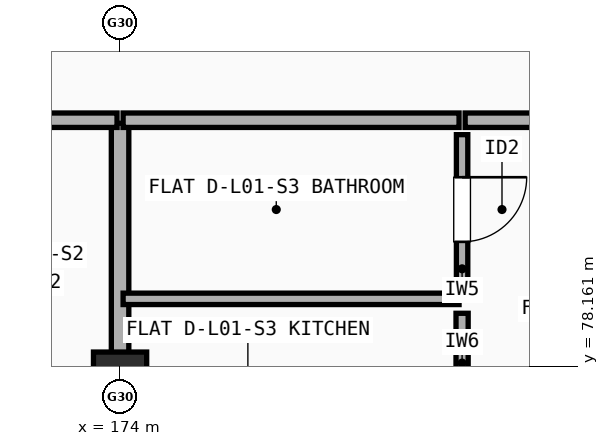
"""IFC4 building model, lengths in metres.
Left out: names, types, materials, properties, quantities, classifications, styles, units other than length and angle.
Written with IfcOpenShell. Run it as: python <this file> out.ifc"""

import sys

from ifc_helpers import new_model, si_unit, direction, frame, frame_2d, origin, origin_2d, place, context, subcontext, project, spatial, rectangle, extrude, element, fill, save


model = new_model("IFC4")
c1 = context("Model", 3, precision=1e-05, world=origin(), true_north=direction((0.0, 1.0)))
c2 = subcontext(c1, "Body", "Model", "MODEL_VIEW")
j1 = project(units=[si_unit("LENGTHUNIT", "METRE"), si_unit("PLANEANGLEUNIT", "RADIAN")], contexts=[c1])
p1 = place(None, origin())
s1 = spatial("IfcSite", under=j1, at=p1, CompositionType="ELEMENT")
p2 = place(p1, origin())
s2 = spatial("IfcBuilding", under=s1, at=p2, CompositionType="ELEMENT")
p3 = place(p2, frame((0.0, 0.0, 4.5)))
s3 = spatial("IfcBuildingStorey", under=s2, at=p3, CompositionType="ELEMENT", Elevation=4.5)
p4 = place(p3, frame((174.0, 78.0, 0.0), z_axis=(0.0, 0.0, 1.0), x_axis=(1.0, 0.0, 0.0)))
e1 = element("IfcColumn", 1, at=p4, inside=s3, PredefinedType="COLUMN", context=c2, shape_type="SweptSolid", body=[
    extrude(rectangle(XDim=0.7, YDim=0.7, at=origin_2d()), origin(), (0.0, 0.0, 1.0), 2.945),
])
p5 = place(p3, frame((174.0, 72.39, 0.0), z_axis=(0.0, 0.0, 1.0), x_axis=(0.0, 1.0, 0.0)))
e2 = element("IfcWall", 2, at=p5, inside=s3, PredefinedType="SOLIDWALL", context=c2, shape_type="SweptSolid", body=[
    extrude(rectangle(XDim=8.97, YDim=0.23, at=frame_2d((4.485, 0.0))), origin(), (0.0, 0.0, 1.0), 2.945),
])
p6 = place(p3, frame((171.04, 81.4, 0.0), z_axis=(0.0, 0.0, 1.0), x_axis=(1.0, 0.0, 0.0)))
e3 = element("IfcWall", 3, at=p6, inside=s3, PredefinedType="SOLIDWALL", context=c2, shape_type="SweptSolid", body=[
    extrude(rectangle(XDim=2.92, YDim=0.19, at=frame_2d((1.46, 0.0))), origin(), (0.0, 0.0, 1.0), 2.945),
])
p7 = place(p3, frame((174.04, 81.4, 0.0), z_axis=(0.0, 0.0, 1.0), x_axis=(1.0, 0.0, 0.0)))
e4 = element("IfcWall", 4, at=p7, inside=s3, PredefinedType="SOLIDWALL", context=c2, shape_type="SweptSolid", body=[
    extrude(rectangle(XDim=4.42, YDim=0.19, at=frame_2d((2.21, 0.0))), origin(), (0.0, 0.0, 1.0), 2.945),
])
p8 = place(p3, frame((178.54, 81.4, 0.0), z_axis=(0.0, 0.0, 1.0), x_axis=(1.0, 0.0, 0.0)))
e5 = element("IfcWall", 5, at=p8, inside=s3, PredefinedType="SOLIDWALL", context=c2, shape_type="SweptSolid", body=[
    extrude(rectangle(XDim=4.42, YDim=0.19, at=frame_2d((2.21, 0.0))), origin(), (0.0, 0.0, 1.0), 2.945),
])
p9 = place(p8, frame((1.685, 0.0, 0.0)))
e6 = element("IfcOpeningElement", 6, at=p9, cuts=e5, PredefinedType="OPENING", context=c2, shape_type="SweptSolid", body=[
    extrude(rectangle(XDim=1.05, YDim=2.15, at=frame_2d((0.525, 1.075))), frame((0.0, 0.105, 0.0), z_axis=(0.0, -1.0, 0.0), x_axis=(1.0, 0.0, 0.0)), (0.0, 0.0, 1.0), 0.21),
])
p10 = place(p3, frame((178.5, 76.39, 0.0), z_axis=(0.0, 0.0, 1.0), x_axis=(0.0, 1.0, 0.0)))
e7 = element("IfcWall", 7, at=p10, inside=s3, PredefinedType="PLUMBINGWALL", context=c2, shape_type="SweptSolid", body=[
    extrude(rectangle(XDim=2.47, YDim=0.16, at=frame_2d((1.235, 0.0))), origin(), (0.0, 0.0, 1.0), 2.408),
])
p11 = place(p10, frame((0.13, 0.0, 0.0)))
e8 = element("IfcOpeningElement", 8, at=p11, cuts=e7, PredefinedType="OPENING", context=c2, shape_type="SweptSolid", body=[
    extrude(rectangle(XDim=0.88, YDim=2.1, at=frame_2d((0.44, 1.05))), frame((0.0, 0.09, 0.0), z_axis=(0.0, -1.0, 0.0), x_axis=(1.0, 0.0, 0.0)), (0.0, 0.0, 1.0), 0.18),
])
p12 = place(p3, frame((178.5, 79.24, 0.0), z_axis=(0.0, 0.0, 1.0), x_axis=(0.0, 1.0, 0.0)))
e9 = element("IfcWall", 9, at=p12, inside=s3, PredefinedType="PARTITIONING", context=c2, shape_type="SweptSolid", body=[
    extrude(rectangle(XDim=1.97, YDim=0.15, at=frame_2d((0.985, 0.0))), origin(), (0.0, 0.0, 1.0), 2.945),
])
p13 = place(p12, frame((0.56, 0.0, 0.0)))
e10 = element("IfcOpeningElement", 10, at=p13, cuts=e9, PredefinedType="OPENING", context=c2, shape_type="SweptSolid", body=[
    extrude(rectangle(XDim=0.85, YDim=2.1, at=frame_2d((0.425, 1.05))), frame((0.0, 0.085, 0.0), z_axis=(0.0, -1.0, 0.0), x_axis=(1.0, 0.0, 0.0)), (0.0, 0.0, 1.0), 0.17),
])
p14 = place(p3, frame((174.04, 79.05, 0.0), z_axis=(0.0, 0.0, 1.0), x_axis=(1.0, 0.0, 0.0)))
e11 = element("IfcWall", 11, at=p14, inside=s3, PredefinedType="PARTITIONING", context=c2, shape_type="SweptSolid", body=[
    extrude(rectangle(XDim=4.42, YDim=0.15, at=frame_2d((2.21, 0.0))), origin(), (0.0, 0.0, 1.0), 2.945),
])
p15 = place(p13, origin())
e12 = element("IfcDoor", 12, at=p15, inside=s3, OperationType="SINGLE_SWING_RIGHT", PredefinedType="DOOR", context=c2, shape_type="SweptSolid", body=[
    extrude(rectangle(XDim=0.85, YDim=2.1, at=frame_2d((0.425, 1.05))), frame((0.0, 0.025, 0.0), z_axis=(0.0, -1.0, 0.0), x_axis=(1.0, 0.0, 0.0)), (0.0, 0.0, 1.0), 0.05),
])
fill(e10, e12)
save(model, sys.argv[1])
